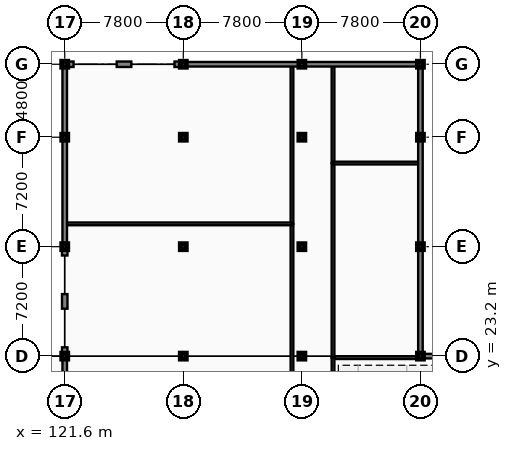
"""IFC4 building model, lengths in metres.
Left out: names, types, materials, properties, quantities, classifications, styles, units other than length and angle.
Written with IfcOpenShell. Run it as: python <this file> out.ifc"""

import sys

from ifc_helpers import new_model, si_unit, direction, frame, frame_2d, origin, origin_2d, place, context, subcontext, project, spatial, rectangle, extrude, element, fill, save


model = new_model("IFC4")
c1 = context("Model", 3, precision=1e-05, world=origin(), true_north=direction((0.0, 1.0)))
c2 = subcontext(c1, "Body", "Model", "MODEL_VIEW")
j1 = project(units=[si_unit("LENGTHUNIT", "METRE"), si_unit("PLANEANGLEUNIT", "RADIAN")], contexts=[c1])
p1 = place(None, origin())
s1 = spatial("IfcSite", under=j1, at=p1, CompositionType="ELEMENT")
p2 = place(p1, origin())
s2 = spatial("IfcBuilding", under=s1, at=p2, CompositionType="ELEMENT")
p3 = place(p2, frame((0.0, 0.0, 5.4)))
s3 = spatial("IfcBuildingStorey", under=s2, at=p3, CompositionType="ELEMENT", Elevation=5.4)
for number, where, z_axis, x_axis in (
    (1, (121.6, 23.2, 0.0), (0.0, 0.0, 1.0), (1.0, 0.0, 0.0)),
    (2, (121.6, 30.4, 0.0), (0.0, 0.0, 1.0), (1.0, 0.0, 0.0)),
    (3, (121.6, 37.6, 0.0), (0.0, 0.0, 1.0), (1.0, 0.0, 0.0)),
    (4, (121.6, 42.4, 0.0), (0.0, 0.0, 1.0), (1.0, 0.0, 0.0)),
    (5, (129.4, 23.2, 0.0), (0.0, 0.0, 1.0), (1.0, 0.0, 0.0)),
    (6, (129.4, 30.4, 0.0), (0.0, 0.0, 1.0), (1.0, 0.0, 0.0)),
    (7, (129.4, 37.6, 0.0), (0.0, 0.0, 1.0), (1.0, 0.0, 0.0)),
    (8, (129.4, 42.4, 0.0), (0.0, 0.0, 1.0), (1.0, 0.0, 0.0)),
    (9, (137.2, 23.2, 0.0), (0.0, 0.0, 1.0), (1.0, 0.0, 0.0)),
    (10, (137.2, 30.4, 0.0), (0.0, 0.0, 1.0), (1.0, 0.0, 0.0)),
    (11, (137.2, 37.6, 0.0), (0.0, 0.0, 1.0), (1.0, 0.0, 0.0)),
    (12, (137.2, 42.4, 0.0), (0.0, 0.0, 1.0), (1.0, 0.0, 0.0)),
    (13, (145.0, 23.2, 0.0), (0.0, 0.0, 1.0), (1.0, 0.0, 0.0)),
    (14, (145.0, 30.4, 0.0), (0.0, 0.0, 1.0), (1.0, 0.0, 0.0)),
    (15, (145.0, 37.6, 0.0), (0.0, 0.0, 1.0), (1.0, 0.0, 0.0)),
    (16, (145.0, 42.4, 0.0), (0.0, 0.0, 1.0), (1.0, 0.0, 0.0)),
):
    element("IfcColumn", number, at=place(p3, frame(where, z_axis=z_axis, x_axis=x_axis)), inside=s3, PredefinedType="COLUMN", context=c2, shape_type="SweptSolid", body=[
        extrude(rectangle(XDim=0.4, YDim=0.4, at=origin_2d()), origin(), (0.0, 0.0, 1.0), 4.2),
    ])
p4 = place(p3, frame((136.55, 16.65, 0.0), z_axis=(0.0, 0.0, 1.0), x_axis=(0.0, 1.0, 0.0)))
e17 = element("IfcWall", 17, at=p4, inside=s3, PredefinedType="PARTITIONING", context=c2, shape_type="SweptSolid", body=[
    extrude(rectangle(XDim=15.25, YDim=0.18, at=frame_2d((7.625, 0.0))), origin(), (0.0, 0.0, 1.0), 3.67),
])
p5 = place(p4, frame((4.56, 0.0, -0.01)))
e18 = element("IfcOpeningElement", 18, at=p5, cuts=e17, PredefinedType="OPENING", context=c2, shape_type="SweptSolid", body=[
    extrude(rectangle(XDim=1.0, YDim=2.16, at=frame_2d((0.5, 1.08))), frame((0.0, 0.1, 0.0), z_axis=(0.0, -1.0, 0.0), x_axis=(1.0, 0.0, 0.0)), (0.0, 0.0, 1.0), 0.2),
])
p6 = place(p3, frame((136.55, 31.9, 0.0), z_axis=(0.0, 0.0, 1.0), x_axis=(0.0, 1.0, 0.0)))
e19 = element("IfcWall", 19, at=p6, inside=s3, PredefinedType="PARTITIONING", context=c2, shape_type="SweptSolid", body=[
    extrude(rectangle(XDim=10.36, YDim=0.18, at=frame_2d((5.18, 0.0))), origin(), (0.0, 0.0, 1.0), 3.67),
])
p7 = place(p6, frame((2.995, 0.0, -0.01)))
e20 = element("IfcOpeningElement", 20, at=p7, cuts=e19, PredefinedType="OPENING", context=c2, shape_type="SweptSolid", body=[
    extrude(rectangle(XDim=1.0, YDim=2.16, at=frame_2d((0.5, 1.08))), frame((0.0, 0.1, 0.0), z_axis=(0.0, -1.0, 0.0), x_axis=(1.0, 0.0, 0.0)), (0.0, 0.0, 1.0), 0.2),
])
p8 = place(p3, frame((121.74, 31.9, 0.0), z_axis=(0.0, 0.0, 1.0), x_axis=(1.0, 0.0, 0.0)))
e21 = element("IfcWall", 21, at=p8, inside=s3, PredefinedType="PARTITIONING", context=c2, shape_type="SweptSolid", body=[
    extrude(rectangle(XDim=14.81, YDim=0.18, at=frame_2d((7.405, 0.0))), origin(), (0.0, 0.0, 1.0), 3.59),
])
p9 = place(p3, frame((139.25, 23.1, 0.0), z_axis=(0.0, 0.0, 1.0), x_axis=(1.0, 0.0, 0.0)))
e22 = element("IfcWall", 22, at=p9, inside=s3, PredefinedType="PARTITIONING", context=c2, shape_type="SweptSolid", body=[
    extrude(rectangle(XDim=5.61, YDim=0.18, at=frame_2d((2.805, 0.0))), origin(), (0.0, 0.0, 1.0), 3.59),
])
p10 = place(p3, frame((139.25, 16.65, 0.0), z_axis=(0.0, 0.0, 1.0), x_axis=(0.0, 1.0, 0.0)))
e23 = element("IfcWall", 23, at=p10, inside=s3, PredefinedType="PARTITIONING", context=c2, shape_type="SweptSolid", body=[
    extrude(rectangle(XDim=6.45, YDim=0.18, at=frame_2d((3.225, 0.0))), origin(), (0.0, 0.0, 1.0), 3.67),
])
p11 = place(p3, frame((139.25, 23.1, 0.0), z_axis=(0.0, 0.0, 1.0), x_axis=(0.0, 1.0, 0.0)))
e24 = element("IfcWall", 24, at=p11, inside=s3, PredefinedType="PARTITIONING", context=c2, shape_type="SweptSolid", body=[
    extrude(rectangle(XDim=12.8, YDim=0.18, at=frame_2d((6.4, 0.0))), origin(), (0.0, 0.0, 1.0), 3.67),
])
p12 = place(p11, frame((5.9, 0.0, -0.01)))
e25 = element("IfcOpeningElement", 25, at=p12, cuts=e24, PredefinedType="OPENING", context=c2, shape_type="SweptSolid", body=[
    extrude(rectangle(XDim=1.0, YDim=2.16, at=frame_2d((0.5, 1.08))), frame((0.0, 0.1, 0.0), z_axis=(0.0, -1.0, 0.0), x_axis=(1.0, 0.0, 0.0)), (0.0, 0.0, 1.0), 0.2),
])
p13 = place(p3, frame((139.25, 35.9, 0.0), z_axis=(0.0, 0.0, 1.0), x_axis=(0.0, 1.0, 0.0)))
e26 = element("IfcWall", 26, at=p13, inside=s3, PredefinedType="PARTITIONING", context=c2, shape_type="SweptSolid", body=[
    extrude(rectangle(XDim=6.36, YDim=0.18, at=frame_2d((3.18, 0.0))), origin(), (0.0, 0.0, 1.0), 3.67),
])
p14 = place(p13, frame((2.68, 0.0, -0.01)))
e27 = element("IfcOpeningElement", 27, at=p14, cuts=e26, PredefinedType="OPENING", context=c2, shape_type="SweptSolid", body=[
    extrude(rectangle(XDim=1.0, YDim=2.16, at=frame_2d((0.5, 1.08))), frame((0.0, 0.1, 0.0), z_axis=(0.0, -1.0, 0.0), x_axis=(1.0, 0.0, 0.0)), (0.0, 0.0, 1.0), 0.2),
])
p15 = place(p3, frame((139.25, 35.9, 0.0), z_axis=(0.0, 0.0, 1.0), x_axis=(1.0, 0.0, 0.0)))
e28 = element("IfcWall", 28, at=p15, inside=s3, PredefinedType="PARTITIONING", context=c2, shape_type="SweptSolid", body=[
    extrude(rectangle(XDim=5.61, YDim=0.18, at=frame_2d((2.805, 0.0))), origin(), (0.0, 0.0, 1.0), 3.59),
])
p16 = place(p3, frame((152.8, 23.2, 0.0), z_axis=(0.0, 0.0, 1.0), x_axis=(-1.0, 0.0, 0.0)))
e29 = element("IfcWall", 29, at=p16, inside=s3, PredefinedType="SOLIDWALL", context=c2, shape_type="SweptSolid", body=[
    extrude(rectangle(XDim=7.8, YDim=0.3, at=frame_2d((3.9, 0.0))), origin(), (0.0, 0.0, 1.0), 3.59),
])
p17 = place(p16, frame((0.46, 0.0, 0.9)))
e30 = element("IfcOpeningElement", 30, at=p17, cuts=e29, PredefinedType="OPENING", context=c2, shape_type="SweptSolid", body=[
    extrude(rectangle(XDim=2.4, YDim=2.25, at=frame_2d((1.2, 1.125))), frame((0.0, 0.16, 0.0), z_axis=(0.0, -1.0, 0.0), x_axis=(1.0, 0.0, 0.0)), (0.0, 0.0, 1.0), 0.32),
])
p18 = place(p16, frame((4.86, 0.0, 0.9)))
e31 = element("IfcOpeningElement", 31, at=p18, cuts=e29, PredefinedType="OPENING", context=c2, shape_type="SweptSolid", body=[
    extrude(rectangle(XDim=2.4, YDim=2.25, at=frame_2d((1.2, 1.125))), frame((0.0, 0.16, 0.0), z_axis=(0.0, -1.0, 0.0), x_axis=(1.0, 0.0, 0.0)), (0.0, 0.0, 1.0), 0.32),
])
p19 = place(p3, frame((121.6, 23.2, 0.0), z_axis=(0.0, 0.0, 1.0), x_axis=(0.0, -1.0, 0.0)))
e32 = element("IfcWall", 32, at=p19, inside=s3, PredefinedType="SOLIDWALL", context=c2, shape_type="SweptSolid", body=[
    extrude(rectangle(XDim=7.2, YDim=0.3, at=frame_2d((3.6, 0.0))), origin(), (0.0, 0.0, 1.0), 3.21),
])
p20 = place(p19, frame((3.0, 0.0, -0.01)))
e33 = element("IfcOpeningElement", 33, at=p20, cuts=e32, PredefinedType="OPENING", context=c2, shape_type="SweptSolid", body=[
    extrude(rectangle(XDim=1.2, YDim=2.21, at=frame_2d((0.6, 1.105))), frame((0.0, 0.16, 0.0), z_axis=(0.0, -1.0, 0.0), x_axis=(1.0, 0.0, 0.0)), (0.0, 0.0, 1.0), 0.32),
])
p21 = place(p3, frame((125.98, 42.4, 0.0), z_axis=(0.0, 0.0, 1.0), x_axis=(-1.0, 0.0, 0.0)))
e34 = element("IfcWall", 34, at=p21, inside=s3, PredefinedType="SOLIDWALL", context=c2, shape_type="SweptSolid", body=[
    extrude(rectangle(XDim=0.96, YDim=0.36, at=frame_2d((0.48, 0.0))), origin(), (0.0, 0.0, 1.0), 3.59),
])
for number, where, z_axis, x_axis in (
    (35, (129.27, 42.4, 0.0), (0.0, 0.0, 1.0), (-1.0, 0.0, 0.0)),
    (36, (122.18, 42.4, 0.0), (0.0, 0.0, 1.0), (-1.0, 0.0, 0.0)),
):
    element("IfcWall", number, at=place(p3, frame(where, z_axis=z_axis, x_axis=x_axis)), inside=s3, PredefinedType="SOLIDWALL", context=c2, shape_type="SweptSolid", body=[
        extrude(rectangle(XDim=0.45, YDim=0.36, at=frame_2d((0.225, 0.0))), origin(), (0.0, 0.0, 1.0), 3.59),
    ])
p22 = place(p3, frame((137.2, 42.4, 0.0), z_axis=(0.0, 0.0, 1.0), x_axis=(-1.0, 0.0, 0.0)))
e37 = element("IfcWall", 37, at=p22, inside=s3, PredefinedType="SOLIDWALL", context=c2, shape_type="SweptSolid", body=[
    extrude(rectangle(XDim=7.8, YDim=0.3, at=frame_2d((3.9, 0.0))), origin(), (0.0, 0.0, 1.0), 3.59),
])
p23 = place(p22, frame((0.86, 0.0, 0.9)))
e38 = element("IfcOpeningElement", 38, at=p23, cuts=e37, PredefinedType="OPENING", context=c2, shape_type="SweptSolid", body=[
    extrude(rectangle(XDim=2.4, YDim=2.25, at=frame_2d((1.2, 1.125))), frame((0.0, 0.16, 0.0), z_axis=(0.0, -1.0, 0.0), x_axis=(1.0, 0.0, 0.0)), (0.0, 0.0, 1.0), 0.32),
])
p24 = place(p22, frame((4.86, 0.0, 0.9)))
e39 = element("IfcOpeningElement", 39, at=p24, cuts=e37, PredefinedType="OPENING", context=c2, shape_type="SweptSolid", body=[
    extrude(rectangle(XDim=2.4, YDim=2.25, at=frame_2d((1.2, 1.125))), frame((0.0, 0.16, 0.0), z_axis=(0.0, -1.0, 0.0), x_axis=(1.0, 0.0, 0.0)), (0.0, 0.0, 1.0), 0.32),
])
p25 = place(p3, frame((145.0, 42.4, 0.0), z_axis=(0.0, 0.0, 1.0), x_axis=(-1.0, 0.0, 0.0)))
e40 = element("IfcWall", 40, at=p25, inside=s3, PredefinedType="SOLIDWALL", context=c2, shape_type="SweptSolid", body=[
    extrude(rectangle(XDim=7.8, YDim=0.3, at=frame_2d((3.9, 0.0))), origin(), (0.0, 0.0, 1.0), 3.59),
])
p26 = place(p25, frame((1.86, 0.0, 0.9)))
e41 = element("IfcOpeningElement", 41, at=p26, cuts=e40, PredefinedType="OPENING", context=c2, shape_type="SweptSolid", body=[
    extrude(rectangle(XDim=2.4, YDim=2.25, at=frame_2d((1.2, 1.125))), frame((0.0, 0.16, 0.0), z_axis=(0.0, -1.0, 0.0), x_axis=(1.0, 0.0, 0.0)), (0.0, 0.0, 1.0), 0.32),
])
p27 = place(p3, frame((121.6, 27.28, 0.0), z_axis=(0.0, 0.0, 1.0), x_axis=(0.0, -1.0, 0.0)))
e42 = element("IfcWall", 42, at=p27, inside=s3, PredefinedType="SOLIDWALL", context=c2, shape_type="SweptSolid", body=[
    extrude(rectangle(XDim=0.96, YDim=0.36, at=frame_2d((0.48, 0.0))), origin(), (0.0, 0.0, 1.0), 3.21),
])
for number, where, z_axis, x_axis in (
    (43, (121.6, 30.27, 0.0), (0.0, 0.0, 1.0), (0.0, -1.0, 0.0)),
    (44, (121.6, 23.78, 0.0), (0.0, 0.0, 1.0), (0.0, -1.0, 0.0)),
):
    element("IfcWall", number, at=place(p3, frame(where, z_axis=z_axis, x_axis=x_axis)), inside=s3, PredefinedType="SOLIDWALL", context=c2, shape_type="SweptSolid", body=[
        extrude(rectangle(XDim=0.45, YDim=0.36, at=frame_2d((0.225, 0.0))), origin(), (0.0, 0.0, 1.0), 3.21),
    ])
p28 = place(p3, frame((121.6, 37.6, 0.0), z_axis=(0.0, 0.0, 1.0), x_axis=(0.0, -1.0, 0.0)))
e45 = element("IfcWall", 45, at=p28, inside=s3, PredefinedType="SOLIDWALL", context=c2, shape_type="SweptSolid", body=[
    extrude(rectangle(XDim=7.2, YDim=0.3, at=frame_2d((3.6, 0.0))), origin(), (0.0, 0.0, 1.0), 3.59),
])
p29 = place(p28, frame((0.46, 0.0, 0.9)))
e46 = element("IfcOpeningElement", 46, at=p29, cuts=e45, PredefinedType="OPENING", context=c2, shape_type="SweptSolid", body=[
    extrude(rectangle(XDim=1.8, YDim=2.25, at=frame_2d((0.9, 1.125))), frame((0.0, 0.16, 0.0), z_axis=(0.0, -1.0, 0.0), x_axis=(1.0, 0.0, 0.0)), (0.0, 0.0, 1.0), 0.32),
])
p30 = place(p28, frame((3.66, 0.0, 0.9)))
e47 = element("IfcOpeningElement", 47, at=p30, cuts=e45, PredefinedType="OPENING", context=c2, shape_type="SweptSolid", body=[
    extrude(rectangle(XDim=1.8, YDim=2.25, at=frame_2d((0.9, 1.125))), frame((0.0, 0.16, 0.0), z_axis=(0.0, -1.0, 0.0), x_axis=(1.0, 0.0, 0.0)), (0.0, 0.0, 1.0), 0.32),
])
p31 = place(p3, frame((121.6, 42.4, 0.0), z_axis=(0.0, 0.0, 1.0), x_axis=(0.0, -1.0, 0.0)))
e48 = element("IfcWall", 48, at=p31, inside=s3, PredefinedType="SOLIDWALL", context=c2, shape_type="SweptSolid", body=[
    extrude(rectangle(XDim=4.8, YDim=0.3, at=frame_2d((2.4, 0.0))), origin(), (0.0, 0.0, 1.0), 3.59),
])
p32 = place(p31, frame((1.46, 0.0, 0.9)))
e49 = element("IfcOpeningElement", 49, at=p32, cuts=e48, PredefinedType="OPENING", context=c2, shape_type="SweptSolid", body=[
    extrude(rectangle(XDim=1.8, YDim=2.25, at=frame_2d((0.9, 1.125))), frame((0.0, 0.16, 0.0), z_axis=(0.0, -1.0, 0.0), x_axis=(1.0, 0.0, 0.0)), (0.0, 0.0, 1.0), 0.32),
])
p33 = place(p3, frame((145.0, 23.2, 0.0), z_axis=(0.0, 0.0, 1.0), x_axis=(0.0, 1.0, 0.0)))
e50 = element("IfcWall", 50, at=p33, inside=s3, PredefinedType="SOLIDWALL", context=c2, shape_type="SweptSolid", body=[
    extrude(rectangle(XDim=7.2, YDim=0.3, at=frame_2d((3.6, 0.0))), origin(), (0.0, 0.0, 1.0), 3.59),
])
p34 = place(p33, frame((0.46, 0.0, 0.9)))
e51 = element("IfcOpeningElement", 51, at=p34, cuts=e50, PredefinedType="OPENING", context=c2, shape_type="SweptSolid", body=[
    extrude(rectangle(XDim=1.8, YDim=2.25, at=frame_2d((0.9, 1.125))), frame((0.0, 0.16, 0.0), z_axis=(0.0, -1.0, 0.0), x_axis=(1.0, 0.0, 0.0)), (0.0, 0.0, 1.0), 0.32),
])
p35 = place(p33, frame((4.86, 0.0, 0.9)))
e52 = element("IfcOpeningElement", 52, at=p35, cuts=e50, PredefinedType="OPENING", context=c2, shape_type="SweptSolid", body=[
    extrude(rectangle(XDim=1.8, YDim=2.25, at=frame_2d((0.9, 1.125))), frame((0.0, 0.16, 0.0), z_axis=(0.0, -1.0, 0.0), x_axis=(1.0, 0.0, 0.0)), (0.0, 0.0, 1.0), 0.32),
])
p36 = place(p3, frame((145.0, 30.4, 0.0), z_axis=(0.0, 0.0, 1.0), x_axis=(0.0, 1.0, 0.0)))
e53 = element("IfcWall", 53, at=p36, inside=s3, PredefinedType="SOLIDWALL", context=c2, shape_type="SweptSolid", body=[
    extrude(rectangle(XDim=7.2, YDim=0.3, at=frame_2d((3.6, 0.0))), origin(), (0.0, 0.0, 1.0), 3.59),
])
p37 = place(p36, frame((0.46, 0.0, 0.9)))
e54 = element("IfcOpeningElement", 54, at=p37, cuts=e53, PredefinedType="OPENING", context=c2, shape_type="SweptSolid", body=[
    extrude(rectangle(XDim=1.8, YDim=2.25, at=frame_2d((0.9, 1.125))), frame((0.0, 0.16, 0.0), z_axis=(0.0, -1.0, 0.0), x_axis=(1.0, 0.0, 0.0)), (0.0, 0.0, 1.0), 0.32),
])
p38 = place(p36, frame((3.46, 0.0, 0.9)))
e55 = element("IfcOpeningElement", 55, at=p38, cuts=e53, PredefinedType="OPENING", context=c2, shape_type="SweptSolid", body=[
    extrude(rectangle(XDim=1.8, YDim=2.25, at=frame_2d((0.9, 1.125))), frame((0.0, 0.16, 0.0), z_axis=(0.0, -1.0, 0.0), x_axis=(1.0, 0.0, 0.0)), (0.0, 0.0, 1.0), 0.32),
])
p39 = place(p3, frame((145.0, 37.6, 0.0), z_axis=(0.0, 0.0, 1.0), x_axis=(0.0, 1.0, 0.0)))
e56 = element("IfcWall", 56, at=p39, inside=s3, PredefinedType="SOLIDWALL", context=c2, shape_type="SweptSolid", body=[
    extrude(rectangle(XDim=4.8, YDim=0.3, at=frame_2d((2.4, 0.0))), origin(), (0.0, 0.0, 1.0), 3.59),
])
p40 = place(p39, frame((1.46, 0.0, 0.9)))
e57 = element("IfcOpeningElement", 57, at=p40, cuts=e56, PredefinedType="OPENING", context=c2, shape_type="SweptSolid", body=[
    extrude(rectangle(XDim=1.8, YDim=2.25, at=frame_2d((0.9, 1.125))), frame((0.0, 0.16, 0.0), z_axis=(0.0, -1.0, 0.0), x_axis=(1.0, 0.0, 0.0)), (0.0, 0.0, 1.0), 0.32),
])
p41 = place(p5, frame((1.0, 0.0, 0.01), z_axis=(0.0, 0.0, 1.0), x_axis=(-1.0, 0.0, 0.0)))
e58 = element("IfcDoor", 58, at=p41, inside=s3, OperationType="SINGLE_SWING_RIGHT", PredefinedType="DOOR", context=c2, shape_type="SweptSolid", body=[
    extrude(rectangle(XDim=1.0, YDim=2.15, at=frame_2d((0.5, 1.075))), frame((0.0, 0.025, 0.0), z_axis=(0.0, -1.0, 0.0), x_axis=(1.0, 0.0, 0.0)), (0.0, 0.0, 1.0), 0.05),
])
fill(e18, e58)
p42 = place(p7, frame((0.0, 0.0, 0.01)))
e59 = element("IfcDoor", 59, at=p42, inside=s3, OperationType="SINGLE_SWING_LEFT", PredefinedType="DOOR", context=c2, shape_type="SweptSolid", body=[
    extrude(rectangle(XDim=1.0, YDim=2.15, at=frame_2d((0.5, 1.075))), frame((0.0, 0.025, 0.0), z_axis=(0.0, -1.0, 0.0), x_axis=(1.0, 0.0, 0.0)), (0.0, 0.0, 1.0), 0.05),
])
fill(e20, e59)
p43 = place(p12, frame((1.0, 0.0, 0.01), z_axis=(0.0, 0.0, 1.0), x_axis=(-1.0, 0.0, 0.0)))
e60 = element("IfcDoor", 60, at=p43, inside=s3, OperationType="SINGLE_SWING_LEFT", PredefinedType="DOOR", context=c2, shape_type="SweptSolid", body=[
    extrude(rectangle(XDim=1.0, YDim=2.15, at=frame_2d((0.5, 1.075))), frame((0.0, 0.025, 0.0), z_axis=(0.0, -1.0, 0.0), x_axis=(1.0, 0.0, 0.0)), (0.0, 0.0, 1.0), 0.05),
])
fill(e25, e60)
p44 = place(p14, frame((0.0, 0.0, 0.01)))
e61 = element("IfcDoor", 61, at=p44, inside=s3, OperationType="SINGLE_SWING_RIGHT", PredefinedType="DOOR", context=c2, shape_type="SweptSolid", body=[
    extrude(rectangle(XDim=1.0, YDim=2.15, at=frame_2d((0.5, 1.075))), frame((0.0, 0.025, 0.0), z_axis=(0.0, -1.0, 0.0), x_axis=(1.0, 0.0, 0.0)), (0.0, 0.0, 1.0), 0.05),
])
fill(e27, e61)
p45 = place(p18, origin())
e62 = element("IfcWindow", 62, at=p45, inside=s3, PartitioningType="TRIPLE_PANEL_VERTICAL", PredefinedType="WINDOW", context=c2, shape_type="SweptSolid", body=[
    extrude(rectangle(XDim=2.4, YDim=2.25, at=frame_2d((1.2, 1.125))), frame((0.0, 0.03, 0.0), z_axis=(0.0, -1.0, 0.0), x_axis=(1.0, 0.0, 0.0)), (0.0, 0.0, 1.0), 0.06),
])
fill(e31, e62)
p46 = place(p23, origin())
e63 = element("IfcWindow", 63, at=p46, inside=s3, PartitioningType="TRIPLE_PANEL_VERTICAL", PredefinedType="WINDOW", context=c2, shape_type="SweptSolid", body=[
    extrude(rectangle(XDim=2.4, YDim=2.25, at=frame_2d((1.2, 1.125))), frame((0.0, 0.03, 0.0), z_axis=(0.0, -1.0, 0.0), x_axis=(1.0, 0.0, 0.0)), (0.0, 0.0, 1.0), 0.06),
])
fill(e38, e63)
p47 = place(p24, origin())
e64 = element("IfcWindow", 64, at=p47, inside=s3, PartitioningType="TRIPLE_PANEL_VERTICAL", PredefinedType="WINDOW", context=c2, shape_type="SweptSolid", body=[
    extrude(rectangle(XDim=2.4, YDim=2.25, at=frame_2d((1.2, 1.125))), frame((0.0, 0.03, 0.0), z_axis=(0.0, -1.0, 0.0), x_axis=(1.0, 0.0, 0.0)), (0.0, 0.0, 1.0), 0.06),
])
fill(e39, e64)
p48 = place(p26, origin())
e65 = element("IfcWindow", 65, at=p48, inside=s3, PartitioningType="TRIPLE_PANEL_VERTICAL", PredefinedType="WINDOW", context=c2, shape_type="SweptSolid", body=[
    extrude(rectangle(XDim=2.4, YDim=2.25, at=frame_2d((1.2, 1.125))), frame((0.0, 0.03, 0.0), z_axis=(0.0, -1.0, 0.0), x_axis=(1.0, 0.0, 0.0)), (0.0, 0.0, 1.0), 0.06),
])
fill(e41, e65)
p49 = place(p29, origin())
e66 = element("IfcWindow", 66, at=p49, inside=s3, PartitioningType="DOUBLE_PANEL_VERTICAL", PredefinedType="WINDOW", context=c2, shape_type="SweptSolid", body=[
    extrude(rectangle(XDim=1.8, YDim=2.25, at=frame_2d((0.9, 1.125))), frame((0.0, 0.03, 0.0), z_axis=(0.0, -1.0, 0.0), x_axis=(1.0, 0.0, 0.0)), (0.0, 0.0, 1.0), 0.06),
])
fill(e46, e66)
p50 = place(p30, origin())
e67 = element("IfcWindow", 67, at=p50, inside=s3, PartitioningType="DOUBLE_PANEL_VERTICAL", PredefinedType="WINDOW", context=c2, shape_type="SweptSolid", body=[
    extrude(rectangle(XDim=1.8, YDim=2.25, at=frame_2d((0.9, 1.125))), frame((0.0, 0.03, 0.0), z_axis=(0.0, -1.0, 0.0), x_axis=(1.0, 0.0, 0.0)), (0.0, 0.0, 1.0), 0.06),
])
fill(e47, e67)
p51 = place(p32, origin())
e68 = element("IfcWindow", 68, at=p51, inside=s3, PartitioningType="DOUBLE_PANEL_VERTICAL", PredefinedType="WINDOW", context=c2, shape_type="SweptSolid", body=[
    extrude(rectangle(XDim=1.8, YDim=2.25, at=frame_2d((0.9, 1.125))), frame((0.0, 0.03, 0.0), z_axis=(0.0, -1.0, 0.0), x_axis=(1.0, 0.0, 0.0)), (0.0, 0.0, 1.0), 0.06),
])
fill(e49, e68)
p52 = place(p34, origin())
e69 = element("IfcWindow", 69, at=p52, inside=s3, PartitioningType="DOUBLE_PANEL_VERTICAL", PredefinedType="WINDOW", context=c2, shape_type="SweptSolid", body=[
    extrude(rectangle(XDim=1.8, YDim=2.25, at=frame_2d((0.9, 1.125))), frame((0.0, 0.03, 0.0), z_axis=(0.0, -1.0, 0.0), x_axis=(1.0, 0.0, 0.0)), (0.0, 0.0, 1.0), 0.06),
])
fill(e51, e69)
p53 = place(p35, origin())
e70 = element("IfcWindow", 70, at=p53, inside=s3, PartitioningType="DOUBLE_PANEL_VERTICAL", PredefinedType="WINDOW", context=c2, shape_type="SweptSolid", body=[
    extrude(rectangle(XDim=1.8, YDim=2.25, at=frame_2d((0.9, 1.125))), frame((0.0, 0.03, 0.0), z_axis=(0.0, -1.0, 0.0), x_axis=(1.0, 0.0, 0.0)), (0.0, 0.0, 1.0), 0.06),
])
fill(e52, e70)
p54 = place(p37, origin())
e71 = element("IfcWindow", 71, at=p54, inside=s3, PartitioningType="DOUBLE_PANEL_VERTICAL", PredefinedType="WINDOW", context=c2, shape_type="SweptSolid", body=[
    extrude(rectangle(XDim=1.8, YDim=2.25, at=frame_2d((0.9, 1.125))), frame((0.0, 0.03, 0.0), z_axis=(0.0, -1.0, 0.0), x_axis=(1.0, 0.0, 0.0)), (0.0, 0.0, 1.0), 0.06),
])
fill(e54, e71)
p55 = place(p38, origin())
e72 = element("IfcWindow", 72, at=p55, inside=s3, PartitioningType="DOUBLE_PANEL_VERTICAL", PredefinedType="WINDOW", context=c2, shape_type="SweptSolid", body=[
    extrude(rectangle(XDim=1.8, YDim=2.25, at=frame_2d((0.9, 1.125))), frame((0.0, 0.03, 0.0), z_axis=(0.0, -1.0, 0.0), x_axis=(1.0, 0.0, 0.0)), (0.0, 0.0, 1.0), 0.06),
])
fill(e55, e72)
p56 = place(p40, origin())
e73 = element("IfcWindow", 73, at=p56, inside=s3, PartitioningType="DOUBLE_PANEL_VERTICAL", PredefinedType="WINDOW", context=c2, shape_type="SweptSolid", body=[
    extrude(rectangle(XDim=1.8, YDim=2.25, at=frame_2d((0.9, 1.125))), frame((0.0, 0.03, 0.0), z_axis=(0.0, -1.0, 0.0), x_axis=(1.0, 0.0, 0.0)), (0.0, 0.0, 1.0), 0.06),
])
fill(e57, e73)
save(model, sys.argv[1])
